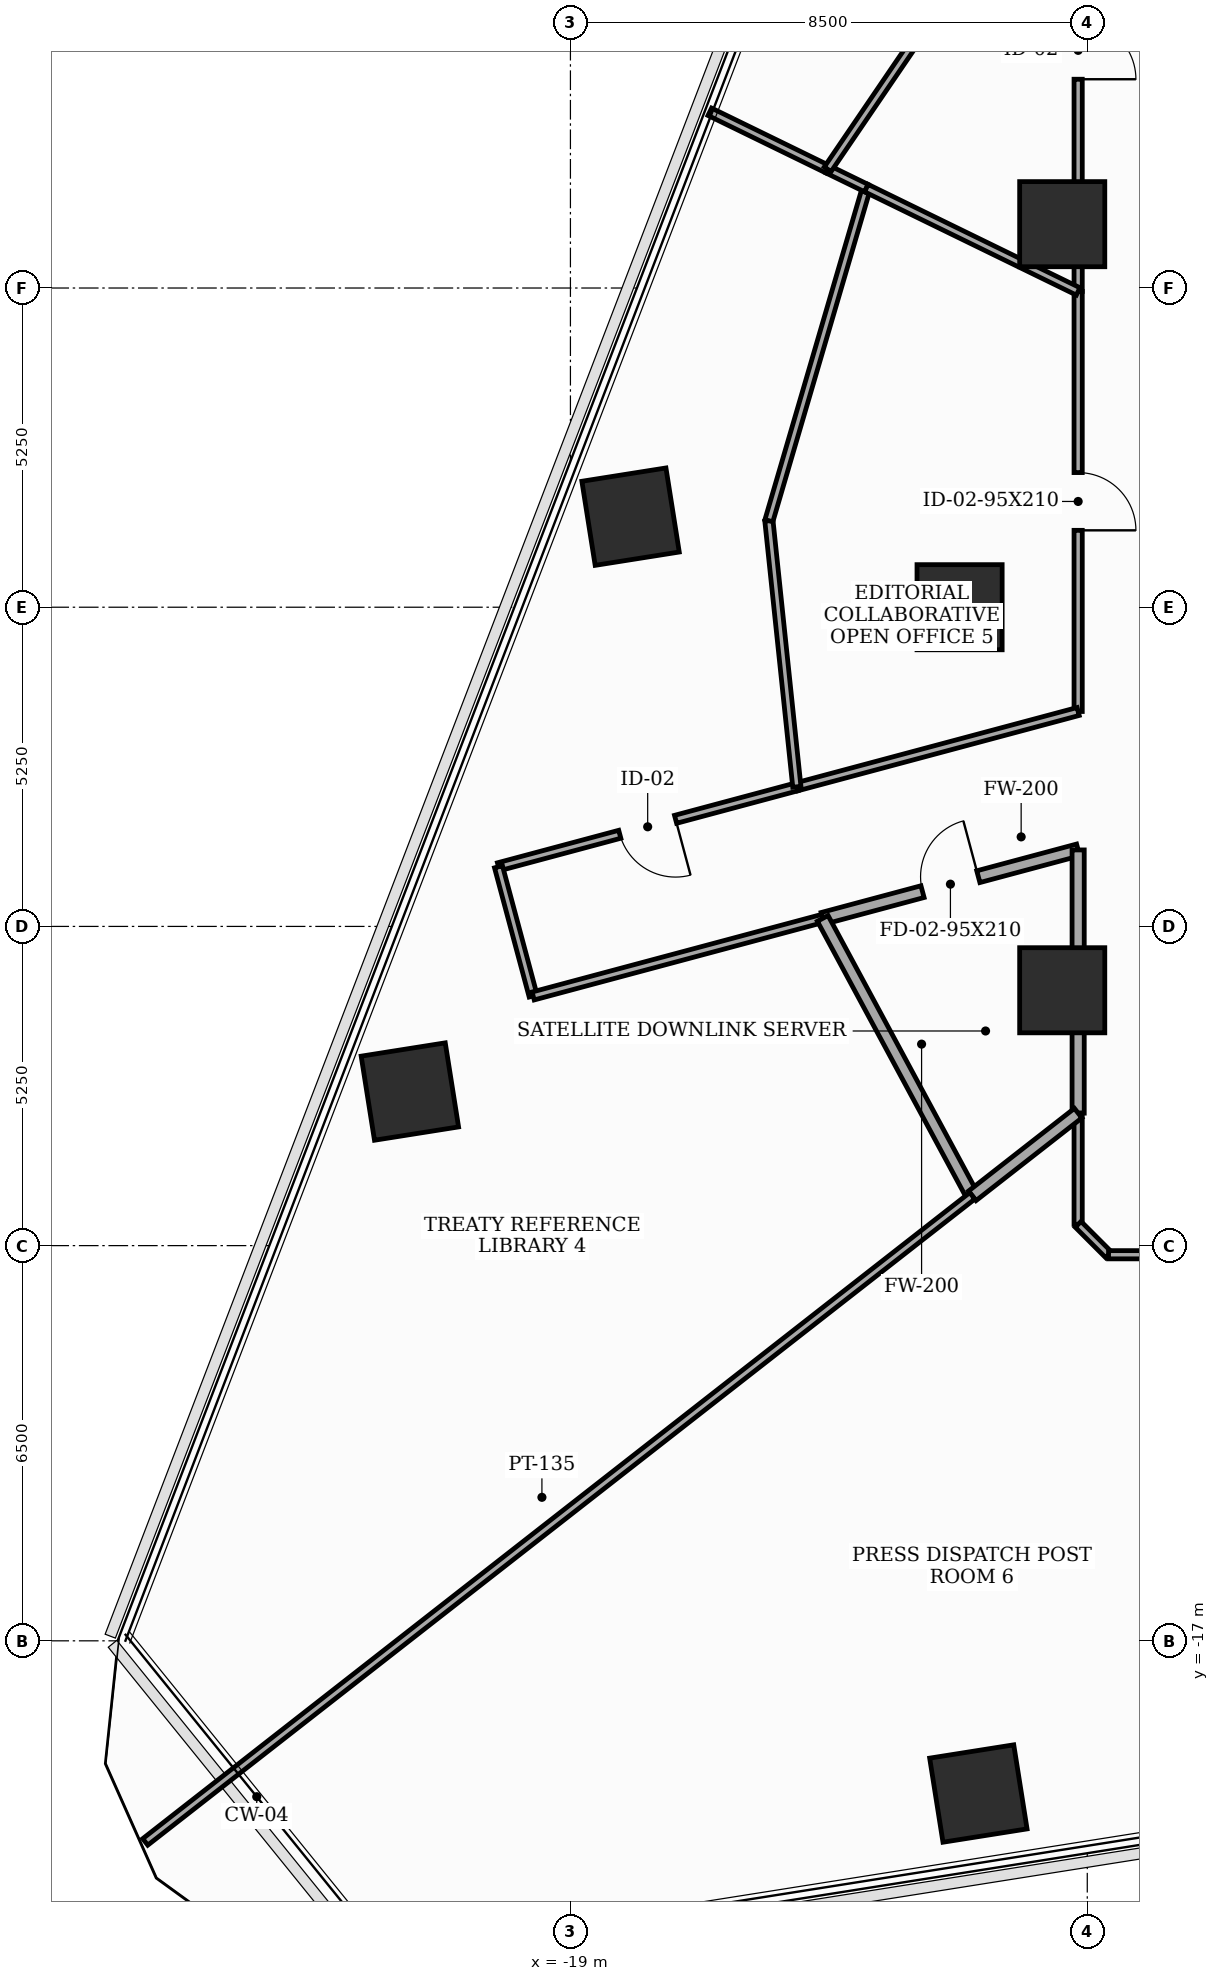
"""IFC4 building model, lengths in metres.
Left out: names, types, materials, properties, quantities, classifications, styles, units other than length and angle.
Written with IfcOpenShell. Run it as: python <this file> out.ifc"""

import sys

from ifc_helpers import new_model, si_unit, direction, frame, frame_2d, origin, origin_2d, place, context, subcontext, project, spatial, rectangle, extrude, element, fill, save


model = new_model("IFC4")
c1 = context("Model", 3, precision=1e-05, world=origin(), true_north=direction((0.0, 1.0)))
c2 = subcontext(c1, "Body", "Model", "MODEL_VIEW")
j1 = project(units=[si_unit("LENGTHUNIT", "METRE"), si_unit("PLANEANGLEUNIT", "RADIAN")], contexts=[c1])
p1 = place(None, origin())
s1 = spatial("IfcSite", under=j1, at=p1, CompositionType="ELEMENT")
p2 = place(p1, origin())
s2 = spatial("IfcBuilding", under=s1, at=p2, CompositionType="ELEMENT")
p3 = place(p2, frame((0.0, 0.0, 81.5)))
s3 = spatial("IfcBuildingStorey", under=s2, at=p3, CompositionType="ELEMENT", Elevation=81.5)
for number, where, z_axis, x_axis in (
    (1, (-10.912, 6.3, 0.0), (0.0, 0.0, 1.0), (1.0, 0.0, 0.0)),
    (2, (-12.6, 0.0, 0.0), (0.0, 0.0, 1.0), (1.0, 0.0, 0.0)),
    (3, (-10.912, -6.3, 0.0), (0.0, 0.0, 1.0), (1.0, 0.0, 0.0)),
    (4, (-12.291, -19.511, 0.0), (0.0, 0.0, 1.0), (0.988, 0.156, 0.0)),
    (5, (-18.011, 1.49, 0.0), (0.0, 0.0, 1.0), (0.988, 0.156, 0.0)),
    (6, (-21.641, -7.966, 0.0), (0.0, 0.0, 1.0), (0.988, 0.156, 0.0)),
):
    element("IfcColumn", number, at=place(p3, frame(where, z_axis=z_axis, x_axis=x_axis)), inside=s3, PredefinedType="COLUMN", context=c2, shape_type="SweptSolid", body=[
        extrude(rectangle(XDim=1.4, YDim=1.4, at=origin_2d()), origin(), (0.0, 0.0, 1.0), 3.7),
    ])
p4 = place(p3, frame((-14.851, -5.118, 0.0), z_axis=(0.0, 0.0, 1.0), x_axis=(0.965909963178, 0.258878239783, 0.0)))
e7 = element("IfcWall", 7, at=p4, inside=s3, PredefinedType="SOLIDWALL", context=c2, shape_type="SweptSolid", body=[
    extrude(rectangle(XDim=4.349, YDim=0.2, at=frame_2d((2.175, 0.0))), origin(), (0.0, 0.0, 1.0), 2.745),
])
p5 = place(p4, frame((1.7, 0.0, 0.0)))
e8 = element("IfcOpeningElement", 8, at=p5, cuts=e7, PredefinedType="OPENING", context=c2, shape_type="SweptSolid", body=[
    extrude(rectangle(XDim=0.95, YDim=2.1, at=frame_2d((0.475, 1.05))), frame((0.0, 0.11, 0.0), z_axis=(0.0, -1.0, 0.0), x_axis=(1.0, 0.0, 0.0)), (0.0, 0.0, 1.0), 0.22),
])
p6 = place(p3, frame((-10.65, -3.992, 0.0), z_axis=(0.0, 0.0, 1.0), x_axis=(0.0, -1.0, 0.0)))
e9 = element("IfcWall", 9, at=p6, inside=s3, PredefinedType="SOLIDWALL", context=c2, shape_type="SweptSolid", body=[
    extrude(rectangle(XDim=4.329, YDim=0.2, at=frame_2d((2.165, 0.0))), origin(), (0.0, 0.0, 1.0), 2.745),
])
p7 = place(p3, frame((-15.276, -2.954, 0.0), z_axis=(0.0, 0.0, 1.0), x_axis=(-0.965923168362, -0.258828964418, 0.0)))
e10 = element("IfcWall", 10, at=p7, inside=s3, PredefinedType="PARTITIONING", context=c2, shape_type="SweptSolid", body=[
    extrude(rectangle(XDim=5.08, YDim=0.135, at=frame_2d((2.54, 0.0))), origin(), (0.0, 0.0, 1.0), 2.045),
])
p8 = place(p7, frame((2.065, 0.0, 0.0)))
e11 = element("IfcOpeningElement", 11, at=p8, cuts=e10, PredefinedType="OPENING", context=c2, shape_type="SweptSolid", body=[
    extrude(rectangle(XDim=0.95, YDim=2.0, at=frame_2d((0.475, 1.0))), frame((0.0, 0.077, 0.0), z_axis=(0.0, -1.0, 0.0), x_axis=(1.0, 0.0, 0.0)), (0.0, 0.0, 1.0), 0.155),
])
p9 = place(p3, frame((-20.183, -4.269, 0.0), z_axis=(0.0, 0.0, 1.0), x_axis=(0.259105843213, -0.965848933329, 0.0)))
e12 = element("IfcWall", 12, at=p9, inside=s3, PredefinedType="PARTITIONING", context=c2, shape_type="SweptSolid", body=[
    extrude(rectangle(XDim=2.2, YDim=0.135, at=frame_2d((1.1, 0.0))), origin(), (0.0, 0.0, 1.0), 2.045),
])
p10 = place(p3, frame((-19.613, -6.394, 0.0), z_axis=(0.0, 0.0, 1.0), x_axis=(0.965917766169, 0.258849124007, 0.0)))
e13 = element("IfcWall", 13, at=p10, inside=s3, PredefinedType="PARTITIONING", context=c2, shape_type="SweptSolid", body=[
    extrude(rectangle(XDim=4.93, YDim=0.135, at=frame_2d((2.465, 0.0))), origin(), (0.0, 0.0, 1.0), 3.46),
])
p11 = place(p3, frame((-10.65, 5.194, 0.0), z_axis=(0.0, 0.0, 1.0), x_axis=(0.0, -1.0, 0.0)))
e14 = element("IfcWall", 14, at=p11, inside=s3, PredefinedType="PARTITIONING", context=c2, shape_type="SweptSolid", body=[
    extrude(rectangle(XDim=6.909, YDim=0.135, at=frame_2d((3.455, 0.0))), origin(), (0.0, 0.0, 1.0), 2.745),
])
p12 = place(p11, frame((2.979, 0.0, 0.0)))
e15 = element("IfcOpeningElement", 15, at=p12, cuts=e14, PredefinedType="OPENING", context=c2, shape_type="SweptSolid", body=[
    extrude(rectangle(XDim=0.95, YDim=2.1, at=frame_2d((0.475, 1.05))), frame((0.0, 0.077, 0.0), z_axis=(0.0, -1.0, 0.0), x_axis=(1.0, 0.0, 0.0)), (0.0, 0.0, 1.0), 0.155),
])
p13 = place(p3, frame((-10.65, -1.715, 0.0), z_axis=(0.0, 0.0, 1.0), x_axis=(-0.965952601708, -0.258719097196, 0.0)))
e16 = element("IfcWall", 16, at=p13, inside=s3, PredefinedType="PARTITIONING", context=c2, shape_type="SweptSolid", body=[
    extrude(rectangle(XDim=4.789, YDim=0.135, at=frame_2d((2.395, 0.0))), origin(), (0.0, 0.0, 1.0), 2.745),
])
p14 = place(p3, frame((-10.65, -8.321, 0.0), z_axis=(0.0, 0.0, 1.0), x_axis=(0.0, -1.0, 0.0)))
e17 = element("IfcWall", 17, at=p14, inside=s3, PredefinedType="PARTITIONING", context=c2, shape_type="SweptSolid", body=[
    extrude(rectangle(XDim=1.829, YDim=0.135, at=frame_2d((0.915, 0.0))), origin(), (0.0, 0.0, 1.0), 2.045),
])
p15 = place(p3, frame((-10.65, -10.15, 0.0), z_axis=(0.0, 0.0, 1.0), x_axis=(0.707106781187, -0.707106781187, 0.0)))
e18 = element("IfcWall", 18, at=p15, inside=s3, PredefinedType="PARTITIONING", context=c2, shape_type="SweptSolid", body=[
    extrude(rectangle(XDim=0.707, YDim=0.135, at=frame_2d((0.354, 0.0))), origin(), (0.0, 0.0, 1.0), 3.46),
])
p16 = place(p3, frame((-10.15, -10.65, 0.0), z_axis=(0.0, 0.0, 1.0), x_axis=(1.0, 0.0, 0.0)))
e19 = element("IfcWall", 19, at=p16, inside=s3, PredefinedType="PARTITIONING", context=c2, shape_type="SweptSolid", body=[
    extrude(rectangle(XDim=5.3, YDim=0.135, at=frame_2d((2.65, 0.0))), origin(), (0.0, 0.0, 1.0), 2.045),
])
p17 = place(p16, frame((0.585, 0.0, 0.0)))
e20 = element("IfcOpeningElement", 20, at=p17, cuts=e19, PredefinedType="OPENING", context=c2, shape_type="SweptSolid", body=[
    extrude(rectangle(XDim=0.95, YDim=2.0, at=frame_2d((0.475, 1.0))), frame((0.0, 0.077, 0.0), z_axis=(0.0, -1.0, 0.0), x_axis=(1.0, 0.0, 0.0)), (0.0, 0.0, 1.0), 0.155),
])
p18 = place(p3, frame((-10.65, 10.15, 0.0), z_axis=(0.0, 0.0, 1.0), x_axis=(0.0, -1.0, 0.0)))
e21 = element("IfcWall", 21, at=p18, inside=s3, PredefinedType="PARTITIONING", context=c2, shape_type="SweptSolid", body=[
    extrude(rectangle(XDim=4.956, YDim=0.135, at=frame_2d((2.478, 0.0))), origin(), (0.0, 0.0, 1.0), 2.045),
])
p19 = place(p18, frame((0.516, 0.0, 0.0)))
e22 = element("IfcOpeningElement", 22, at=p19, cuts=e21, PredefinedType="OPENING", context=c2, shape_type="SweptSolid", body=[
    extrude(rectangle(XDim=0.95, YDim=2.0, at=frame_2d((0.475, 1.0))), frame((0.0, 0.077, 0.0), z_axis=(0.0, -1.0, 0.0), x_axis=(1.0, 0.0, 0.0)), (0.0, 0.0, 1.0), 0.155),
])
p20 = place(p3, frame((-14.851, -5.118, 0.0), z_axis=(0.0, 0.0, 1.0), x_axis=(0.474543506137, -0.880232049395, 0.0)))
e23 = element("IfcWall", 23, at=p20, inside=s3, PredefinedType="SOLIDWALL", context=c2, shape_type="SweptSolid", body=[
    extrude(rectangle(XDim=5.184, YDim=0.2, at=frame_2d((2.592, 0.0))), origin(), (0.0, 0.0, 1.0), 2.045),
])
p21 = place(p3, frame((-12.391, -9.681, 0.0), z_axis=(0.0, 0.0, 1.0), x_axis=(0.788124883644, 0.615515367624, 0.0)))
e24 = element("IfcWall", 24, at=p21, inside=s3, PredefinedType="SOLIDWALL", context=c2, shape_type="SweptSolid", body=[
    extrude(rectangle(XDim=2.209, YDim=0.2, at=frame_2d((1.104, 0.0))), origin(), (0.0, 0.0, 1.0), 2.045),
])
p22 = place(p3, frame((-15.276, -2.954, 0.0), z_axis=(0.0, 0.0, 1.0), x_axis=(-0.104560622475, 0.994518514774, 0.0)))
e25 = element("IfcWall", 25, at=p22, inside=s3, PredefinedType="PARTITIONING", context=c2, shape_type="SweptSolid", body=[
    extrude(rectangle(XDim=4.401, YDim=0.135, at=frame_2d((2.201, 0.0))), origin(), (0.0, 0.0, 1.0), 2.045),
])
p23 = place(p3, frame((-15.736, 1.423, 0.0), z_axis=(0.0, 0.0, 1.0), x_axis=(0.281231672123, 0.959639904649, 0.0)))
e26 = element("IfcWall", 26, at=p23, inside=s3, PredefinedType="PARTITIONING", context=c2, shape_type="SweptSolid", body=[
    extrude(rectangle(XDim=5.7, YDim=0.135, at=frame_2d((2.85, 0.0))), origin(), (0.0, 0.0, 1.0), 3.46),
])
p24 = place(p3, frame((-25.993, -20.307, 0.0), z_axis=(0.0, 0.0, 1.0), x_axis=(0.788017511585, 0.61565282541, 0.0)))
e27 = element("IfcWall", 27, at=p24, inside=s3, PredefinedType="PARTITIONING", context=c2, shape_type="SweptSolid", body=[
    extrude(rectangle(XDim=17.26, YDim=0.135, at=frame_2d((8.63, 0.0))), origin(), (0.0, 0.0, 1.0), 2.045),
])
p25 = place(p3, frame((-14.769, 7.203, 0.0), z_axis=(0.0, 0.0, 1.0), x_axis=(-0.898774971292, 0.438410254191, 0.0)))
e28 = element("IfcWall", 28, at=p25, inside=s3, PredefinedType="PARTITIONING", context=c2, shape_type="SweptSolid", body=[
    extrude(rectangle(XDim=2.157, YDim=0.135, at=frame_2d((1.079, 0.0))), origin(), (0.0, 0.0, 1.0), 2.045),
])
p26 = place(p3, frame((-14.133, 6.893, 0.0), z_axis=(0.0, 0.0, 1.0), x_axis=(-0.899003804691, 0.437940816949, 0.0)))
e29 = element("IfcWall", 29, at=p26, inside=s3, PredefinedType="PARTITIONING", context=c2, shape_type="SweptSolid", body=[
    extrude(rectangle(XDim=0.708, YDim=0.135, at=frame_2d((0.354, 0.0))), origin(), (0.0, 0.0, 1.0), 3.46),
])
p27 = place(p3, frame((-10.65, 5.194, 0.0), z_axis=(0.0, 0.0, 1.0), x_axis=(-0.898781159743, 0.438397567159, 0.0)))
e30 = element("IfcWall", 30, at=p27, inside=s3, PredefinedType="PARTITIONING", context=c2, shape_type="SweptSolid", body=[
    extrude(rectangle(XDim=3.875, YDim=0.135, at=frame_2d((1.938, 0.0))), origin(), (0.0, 0.0, 1.0), 2.745),
])
p28 = place(p3, frame((-14.769, 7.203, 0.0), z_axis=(0.0, 0.0, 1.0), x_axis=(0.562841259026, 0.826565010836, 0.0)))
e31 = element("IfcWall", 31, at=p28, inside=s3, PredefinedType="PARTITIONING", context=c2, shape_type="SweptSolid", body=[
    extrude(rectangle(XDim=5.153, YDim=0.135, at=frame_2d((2.576, 0.0))), origin(), (0.0, 0.0, 1.0), 2.045),
])
p29 = place(p5, origin())
e32 = element("IfcDoor", 32, at=p29, inside=s3, OperationType="SINGLE_SWING_RIGHT", PredefinedType="DOOR", context=c2, shape_type="SweptSolid", body=[
    extrude(rectangle(XDim=0.95, YDim=2.1, at=frame_2d((0.475, 1.05))), frame((0.0, 0.025, 0.0), z_axis=(0.0, -1.0, 0.0), x_axis=(1.0, 0.0, 0.0)), (0.0, 0.0, 1.0), 0.05),
])
fill(e8, e32)
p30 = place(p8, origin())
e33 = element("IfcDoor", 33, at=p30, inside=s3, OperationType="SINGLE_SWING_LEFT", PredefinedType="DOOR", context=c2, shape_type="SweptSolid", body=[
    extrude(rectangle(XDim=0.95, YDim=2.0, at=frame_2d((0.475, 1.0))), frame((0.0, 0.025, 0.0), z_axis=(0.0, -1.0, 0.0), x_axis=(1.0, 0.0, 0.0)), (0.0, 0.0, 1.0), 0.05),
])
fill(e11, e33)
p31 = place(p12, origin())
e34 = element("IfcDoor", 34, at=p31, inside=s3, OperationType="SINGLE_SWING_RIGHT", PredefinedType="DOOR", context=c2, shape_type="SweptSolid", body=[
    extrude(rectangle(XDim=0.95, YDim=2.1, at=frame_2d((0.475, 1.05))), frame((0.0, 0.025, 0.0), z_axis=(0.0, -1.0, 0.0), x_axis=(1.0, 0.0, 0.0)), (0.0, 0.0, 1.0), 0.05),
])
fill(e15, e34)
p32 = place(p19, origin())
e35 = element("IfcDoor", 35, at=p32, inside=s3, OperationType="SINGLE_SWING_RIGHT", PredefinedType="DOOR", context=c2, shape_type="SweptSolid", body=[
    extrude(rectangle(XDim=0.95, YDim=2.0, at=frame_2d((0.475, 1.0))), frame((0.0, 0.025, 0.0), z_axis=(0.0, -1.0, 0.0), x_axis=(1.0, 0.0, 0.0)), (0.0, 0.0, 1.0), 0.05),
])
fill(e22, e35)
save(model, sys.argv[1])
